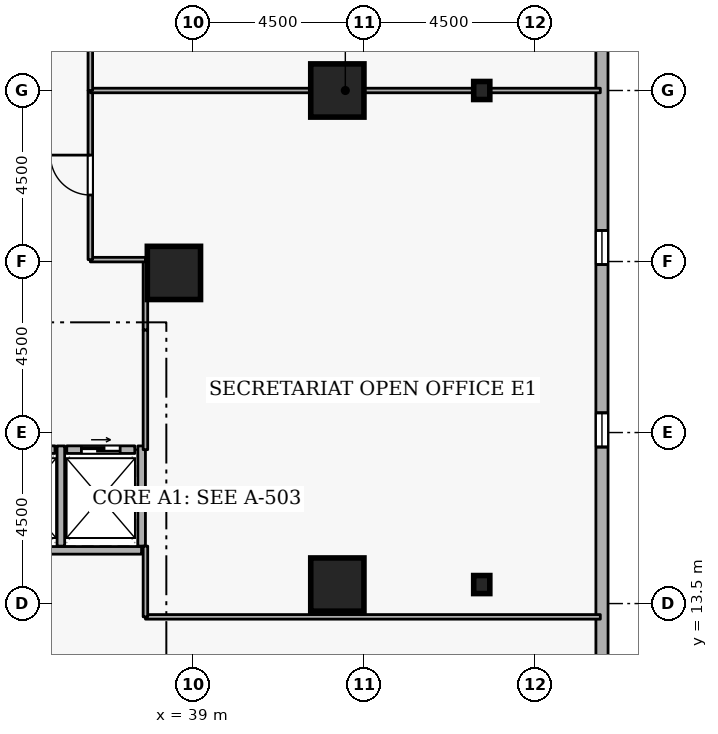
"""IFC4 building model, lengths in metres.
Left out: names, types, materials, properties, quantities, classifications, styles, units other than length and angle.
Written with IfcOpenShell. Run it as: python <this file> out.ifc"""

import sys

from ifc_helpers import new_model, si_unit, direction, frame, frame_2d, origin, origin_2d, place, context, subcontext, project, spatial, rectangle, i_section, extrude, element, fill, save


model = new_model("IFC4")
c1 = context("Model", 3, precision=1e-05, world=origin(), true_north=direction((0.0, 1.0)))
c2 = subcontext(c1, "Body", "Model", "MODEL_VIEW")
j1 = project(units=[si_unit("LENGTHUNIT", "METRE"), si_unit("PLANEANGLEUNIT", "RADIAN")], contexts=[c1])
p1 = place(None, origin())
s1 = spatial("IfcSite", under=j1, at=p1, CompositionType="ELEMENT")
p2 = place(p1, origin())
s2 = spatial("IfcBuilding", under=s1, at=p2, CompositionType="ELEMENT")
p3 = place(p2, frame((0.0, 0.0, 53.7)))
s3 = spatial("IfcBuildingStorey", under=s2, at=p3, CompositionType="ELEMENT", Elevation=53.7)
for number, where, z_axis, x_axis in (
    (1, (42.8, 14.0, 0.0), (0.0, 0.0, 1.0), (1.0, 0.0, 0.0)),
    (2, (42.8, 27.0, 0.0), (0.0, 0.0, 1.0), (1.0, 0.0, 0.0)),
    (3, (38.5, 22.2, 0.0), (0.0, 0.0, 1.0), (1.0, 0.0, 0.0)),
):
    element("IfcColumn", number, at=place(p3, frame(where, z_axis=z_axis, x_axis=x_axis)), inside=s3, PredefinedType="COLUMN", context=c2, shape_type="SweptSolid", body=[
        extrude(rectangle(XDim=1.4, YDim=1.4, at=origin_2d()), origin(), (0.0, 0.0, 1.0), 3.6),
    ])
for number, where, z_axis, x_axis in (
    (4, (46.6, 14.0, 0.0), (0.0, 0.0, 1.0), (1.0, 0.0, 0.0)),
    (5, (46.6, 27.0, 0.0), (0.0, 0.0, 1.0), (1.0, 0.0, 0.0)),
):
    element("IfcColumn", number, at=place(p3, frame(where, z_axis=z_axis, x_axis=x_axis)), inside=s3, PredefinedType="COLUMN", context=c2, shape_type="SweptSolid", body=[
        extrude(i_section(OverallWidth=0.424, OverallDepth=0.475, WebThickness=0.048, FlangeThickness=0.077, FilletRadius=0.015, at=origin_2d()), origin(), (0.0, 0.0, 1.0), 3.6),
    ])
p4 = place(p3, frame((49.765, 5.319, 0.0), z_axis=(0.0, 0.0, 1.0), x_axis=(-0.000121872777, 0.999999992574, 0.0)))
e6 = element("IfcWall", 6, at=p4, inside=s3, PredefinedType="STANDARD", context=c2, shape_type="SweptSolid", body=[
    extrude(rectangle(XDim=36.058, YDim=0.32, at=frame_2d((18.029, 0.0))), origin(), (0.0, 0.0, 1.0), 2.7),
])
p5 = place(p4, frame((2.7, 0.0, 0.72)))
e7 = element("IfcOpeningElement", 7, at=p5, cuts=e6, PredefinedType="OPENING", context=c2, shape_type="SweptSolid", body=[
    extrude(rectangle(XDim=0.9, YDim=1.75, at=frame_2d((0.45, 0.875))), frame((0.0, 0.17, 0.0), z_axis=(0.0, -1.0, 0.0), x_axis=(1.0, 0.0, 0.0)), (0.0, 0.0, 1.0), 0.34),
])
p6 = place(p4, frame((12.3, 0.0, 0.72)))
e8 = element("IfcOpeningElement", 8, at=p6, cuts=e6, PredefinedType="OPENING", context=c2, shape_type="SweptSolid", body=[
    extrude(rectangle(XDim=0.9, YDim=1.75, at=frame_2d((0.45, 0.875))), frame((0.0, 0.17, 0.0), z_axis=(0.0, -1.0, 0.0), x_axis=(1.0, 0.0, 0.0)), (0.0, 0.0, 1.0), 0.34),
])
p7 = place(p4, frame((17.1, 0.0, 0.72)))
e9 = element("IfcOpeningElement", 9, at=p7, cuts=e6, PredefinedType="OPENING", context=c2, shape_type="SweptSolid", body=[
    extrude(rectangle(XDim=0.9, YDim=1.75, at=frame_2d((0.45, 0.875))), frame((0.0, 0.17, 0.0), z_axis=(0.0, -1.0, 0.0), x_axis=(1.0, 0.0, 0.0)), (0.0, 0.0, 1.0), 0.34),
])
p8 = place(p4, frame((26.7, 0.0, 0.72)))
e10 = element("IfcOpeningElement", 10, at=p8, cuts=e6, PredefinedType="OPENING", context=c2, shape_type="SweptSolid", body=[
    extrude(rectangle(XDim=0.9, YDim=1.75, at=frame_2d((0.45, 0.875))), frame((0.0, 0.17, 0.0), z_axis=(0.0, -1.0, 0.0), x_axis=(1.0, 0.0, 0.0)), (0.0, 0.0, 1.0), 0.34),
])
p9 = place(p4, frame((31.5, 0.0, 0.72)))
e11 = element("IfcOpeningElement", 11, at=p9, cuts=e6, PredefinedType="OPENING", context=c2, shape_type="SweptSolid", body=[
    extrude(rectangle(XDim=0.9, YDim=1.75, at=frame_2d((0.45, 0.875))), frame((0.0, 0.17, 0.0), z_axis=(0.0, -1.0, 0.0), x_axis=(1.0, 0.0, 0.0)), (0.0, 0.0, 1.0), 0.34),
])
p10 = place(p3, frame((33.63, 17.55, 0.0), z_axis=(0.0, 0.0, 1.0), x_axis=(1.0, 0.0, 0.0)))
e12 = element("IfcWall", 12, at=p10, inside=s3, PredefinedType="STANDARD", context=c2, shape_type="SweptSolid", body=[
    extrude(rectangle(XDim=1.74, YDim=0.2, at=frame_2d((0.87, 0.0))), origin(), (0.0, 0.0, 1.0), 3.34),
])
p11 = place(p10, frame((0.36, 0.0, 0.0)))
e13 = element("IfcOpeningElement", 13, at=p11, cuts=e12, PredefinedType="OPENING", context=c2, shape_type="SweptSolid", body=[
    extrude(rectangle(XDim=1.02, YDim=2.06, at=frame_2d((0.51, 1.03))), frame((0.0, 0.11, 0.0), z_axis=(0.0, -1.0, 0.0), x_axis=(1.0, 0.0, 0.0)), (0.0, 0.0, 1.0), 0.22),
])
p12 = place(p3, frame((35.68, 17.55, 0.0), z_axis=(0.0, 0.0, 1.0), x_axis=(1.0, 0.0, 0.0)))
e14 = element("IfcWall", 14, at=p12, inside=s3, PredefinedType="STANDARD", context=c2, shape_type="SweptSolid", body=[
    extrude(rectangle(XDim=1.79, YDim=0.2, at=frame_2d((0.895, 0.0))), origin(), (0.0, 0.0, 1.0), 3.34),
])
p13 = place(p12, frame((0.385, 0.0, 0.0)))
e15 = element("IfcOpeningElement", 15, at=p13, cuts=e14, PredefinedType="OPENING", context=c2, shape_type="SweptSolid", body=[
    extrude(rectangle(XDim=1.02, YDim=2.06, at=frame_2d((0.51, 1.03))), frame((0.0, 0.11, 0.0), z_axis=(0.0, -1.0, 0.0), x_axis=(1.0, 0.0, 0.0)), (0.0, 0.0, 1.0), 0.22),
])
p14 = place(p3, frame((33.452, 14.9, 0.0), z_axis=(0.0, 0.0, 1.0), x_axis=(1.0, 0.0, 0.0)))
e16 = element("IfcWall", 16, at=p14, inside=s3, PredefinedType="STANDARD", context=c2, shape_type="SweptSolid", body=[
    extrude(rectangle(XDim=4.196, YDim=0.2, at=frame_2d((2.098, 0.0))), origin(), (0.0, 0.0, 1.0), 3.34),
])
for number, where, z_axis, x_axis in (
    (17, (35.525, 15.012, 0.0), (0.0, 0.0, 1.0), (0.0, 1.0, 0.0)),
    (18, (37.65, 15.012, 0.0), (0.0, 0.0, 1.0), (0.0, 1.0, 0.0)),
):
    element("IfcWall", number, at=place(p3, frame(where, z_axis=z_axis, x_axis=x_axis)), inside=s3, PredefinedType="STANDARD", context=c2, shape_type="SweptSolid", body=[
        extrude(rectangle(XDim=2.636, YDim=0.2, at=frame_2d((1.318, 0.0))), origin(), (0.0, 0.0, 1.0), 3.34),
    ])
p15 = place(p3, frame((37.75, 17.55, 0.0), z_axis=(0.0, 0.0, 1.0), x_axis=(0.0, 1.0, 0.0)))
e19 = element("IfcWall", 19, at=p15, inside=s3, PredefinedType="PARTITIONING", context=c2, shape_type="SweptSolid", body=[
    extrude(rectangle(XDim=3.15, YDim=0.12, at=frame_2d((1.575, 0.0))), origin(), (0.0, 0.0, 1.0), 3.34),
])
p16 = place(p3, frame((37.75, 20.7, 0.0), z_axis=(0.0, 0.0, 1.0), x_axis=(0.0, 1.0, 0.0)))
e20 = element("IfcWall", 20, at=p16, inside=s3, PredefinedType="PARTITIONING", context=c2, shape_type="SweptSolid", body=[
    extrude(rectangle(XDim=1.85, YDim=0.12, at=frame_2d((0.925, 0.0))), origin(), (0.0, 0.0, 1.0), 3.34),
])
p17 = place(p3, frame((37.75, 22.55, 0.0), z_axis=(0.0, 0.0, 1.0), x_axis=(-1.0, 0.0, 0.0)))
e21 = element("IfcWall", 21, at=p17, inside=s3, PredefinedType="PARTITIONING", context=c2, shape_type="SweptSolid", body=[
    extrude(rectangle(XDim=1.45, YDim=0.12, at=frame_2d((0.725, 0.0))), origin(), (0.0, 0.0, 1.0), 3.34),
])
p18 = place(p3, frame((36.3, 22.55, 0.0), z_axis=(0.0, 0.0, 1.0), x_axis=(0.0, 1.0, 0.0)))
e22 = element("IfcWall", 22, at=p18, inside=s3, PredefinedType="PARTITIONING", context=c2, shape_type="SweptSolid", body=[
    extrude(rectangle(XDim=4.45, YDim=0.12, at=frame_2d((2.225, 0.0))), origin(), (0.0, 0.0, 1.0), 3.34),
])
p19 = place(p18, frame((1.7, 0.0, 0.0)))
e23 = element("IfcOpeningElement", 23, at=p19, cuts=e22, PredefinedType="OPENING", context=c2, shape_type="SweptSolid", body=[
    extrude(rectangle(XDim=1.05, YDim=2.1, at=frame_2d((0.525, 1.05))), frame((0.0, 0.07, 0.0), z_axis=(0.0, -1.0, 0.0), x_axis=(1.0, 0.0, 0.0)), (0.0, 0.0, 1.0), 0.14),
])
p20 = place(p3, frame((36.3, 27.0, 0.0), z_axis=(0.0, 0.0, 1.0), x_axis=(1.0, 0.0, 0.0)))
e24 = element("IfcWall", 24, at=p20, inside=s3, PredefinedType="PARTITIONING", context=c2, shape_type="SweptSolid", body=[
    extrude(rectangle(XDim=13.42, YDim=0.12, at=frame_2d((6.71, 0.0))), origin(), (0.0, 0.0, 1.0), 2.932),
])
p21 = place(p3, frame((49.72, 13.15, 0.0), z_axis=(0.0, 0.0, 1.0), x_axis=(-1.0, 0.0, 0.0)))
e25 = element("IfcWall", 25, at=p21, inside=s3, PredefinedType="PARTITIONING", context=c2, shape_type="SweptSolid", body=[
    extrude(rectangle(XDim=11.97, YDim=0.12, at=frame_2d((5.985, 0.0))), origin(), (0.0, 0.0, 1.0), 3.34),
])
p22 = place(p3, frame((37.75, 13.15, 0.0), z_axis=(0.0, 0.0, 1.0), x_axis=(0.0, 1.0, 0.0)))
e26 = element("IfcWall", 26, at=p22, inside=s3, PredefinedType="PARTITIONING", context=c2, shape_type="SweptSolid", body=[
    extrude(rectangle(XDim=1.862, YDim=0.12, at=frame_2d((0.931, 0.0))), origin(), (0.0, 0.0, 1.0), 3.34),
])
p23 = place(p3, frame((36.3, 27.0, 0.0), z_axis=(0.0, 0.0, 1.0), x_axis=(0.0, 1.0, 0.0)))
e27 = element("IfcWall", 27, at=p23, inside=s3, PredefinedType="PARTITIONING", context=c2, shape_type="SweptSolid", body=[
    extrude(rectangle(XDim=4.45, YDim=0.12, at=frame_2d((2.225, 0.0))), origin(), (0.0, 0.0, 1.0), 3.34),
])
p24 = place(p23, frame((1.7, 0.0, 0.0)))
e28 = element("IfcOpeningElement", 28, at=p24, cuts=e27, PredefinedType="OPENING", context=c2, shape_type="SweptSolid", body=[
    extrude(rectangle(XDim=1.05, YDim=2.1, at=frame_2d((0.525, 1.05))), frame((0.0, 0.07, 0.0), z_axis=(0.0, -1.0, 0.0), x_axis=(1.0, 0.0, 0.0)), (0.0, 0.0, 1.0), 0.14),
])
p25 = place(p6, origin())
e29 = element("IfcWindow", 29, at=p25, inside=s3, PartitioningType="SINGLE_PANEL", PredefinedType="WINDOW", context=c2, shape_type="SweptSolid", body=[
    extrude(rectangle(XDim=0.9, YDim=1.75, at=frame_2d((0.45, 0.875))), frame((0.0, 0.03, 0.0), z_axis=(0.0, -1.0, 0.0), x_axis=(1.0, 0.0, 0.0)), (0.0, 0.0, 1.0), 0.06),
])
fill(e8, e29)
p26 = place(p7, origin())
e30 = element("IfcWindow", 30, at=p26, inside=s3, PartitioningType="SINGLE_PANEL", PredefinedType="WINDOW", context=c2, shape_type="SweptSolid", body=[
    extrude(rectangle(XDim=0.9, YDim=1.75, at=frame_2d((0.45, 0.875))), frame((0.0, 0.03, 0.0), z_axis=(0.0, -1.0, 0.0), x_axis=(1.0, 0.0, 0.0)), (0.0, 0.0, 1.0), 0.06),
])
fill(e9, e30)
p27 = place(p13, origin())
e31 = element("IfcDoor", 31, at=p27, inside=s3, OperationType="SLIDING_TO_LEFT", PredefinedType="DOOR", context=c2, shape_type="SweptSolid", body=[
    extrude(rectangle(XDim=1.02, YDim=2.06, at=frame_2d((0.51, 1.03))), frame((0.0, 0.025, 0.0), z_axis=(0.0, -1.0, 0.0), x_axis=(1.0, 0.0, 0.0)), (0.0, 0.0, 1.0), 0.05),
])
fill(e15, e31)
p28 = place(p19, origin())
e32 = element("IfcDoor", 32, at=p28, inside=s3, OperationType="SINGLE_SWING_RIGHT", PredefinedType="DOOR", context=c2, shape_type="SweptSolid", body=[
    extrude(rectangle(XDim=1.05, YDim=2.1, at=frame_2d((0.525, 1.05))), frame((0.0, 0.025, 0.0), z_axis=(0.0, -1.0, 0.0), x_axis=(1.0, 0.0, 0.0)), (0.0, 0.0, 1.0), 0.05),
])
fill(e23, e32)
save(model, sys.argv[1])
